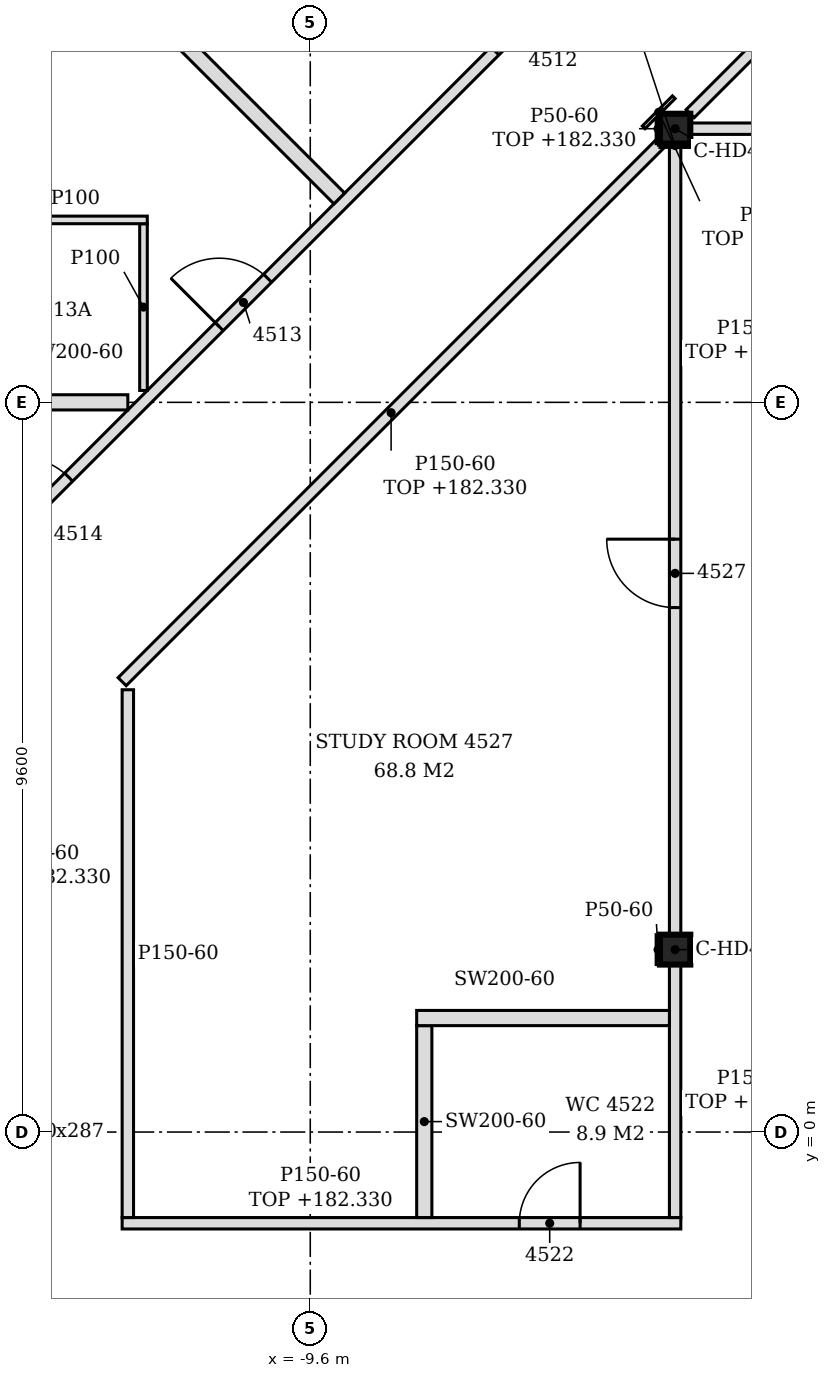
"""IFC4 building model, lengths in metres.
Left out: names, types, materials, properties, quantities, classifications, styles, units other than length and angle.
Written with IfcOpenShell. Run it as: python <this file> out.ifc"""

import sys

from ifc_helpers import new_model, si_unit, direction, frame, frame_2d, origin, origin_2d, place, context, subcontext, project, spatial, polyline, rectangle, i_section, outline, extrude, element, fill, save


model = new_model("IFC4")
c1 = context("Model", 3, precision=1e-05, world=origin(), true_north=direction((0.0, 1.0)))
c2 = subcontext(c1, "Body", "Model", "MODEL_VIEW")
j1 = project(units=[si_unit("LENGTHUNIT", "METRE"), si_unit("PLANEANGLEUNIT", "RADIAN")], contexts=[c1])
p1 = place(None, origin())
s1 = spatial("IfcSite", under=j1, at=p1, CompositionType="ELEMENT")
p2 = place(p1, origin())
s2 = spatial("IfcBuilding", under=s1, at=p2, CompositionType="ELEMENT")
p3 = place(p2, frame((0.0, 0.0, 179.4)))
s3 = spatial("IfcBuildingStorey", under=s2, at=p3, CompositionType="ELEMENT", Elevation=179.4)
for number, where, z_axis, x_axis in (
    (1, (-4.8, 2.4, -0.15), (0.0, 0.0, 1.0), (1.0, 0.0, 0.0)),
    (2, (-4.8, 13.2, -0.15), (0.0, 0.0, 1.0), (1.0, 0.0, 0.0)),
):
    element("IfcColumn", number, at=place(p3, frame(where, z_axis=z_axis, x_axis=x_axis)), inside=s3, PredefinedType="COLUMN", context=c2, shape_type="SweptSolid", body=[
        extrude(i_section(OverallWidth=0.399, OverallDepth=0.393, WebThickness=0.023, FlangeThickness=0.037, FilletRadius=0.015, at=origin_2d()), origin(), (0.0, 0.0, 1.0), 3.6),
    ])
p4 = place(p3, frame((-12.075, -1.2, 0.0), z_axis=(0.0, 0.0, 1.0), x_axis=(1.0, 0.0, 0.0)))
e3 = element("IfcWall", 3, at=p4, inside=s3, PredefinedType="PARTITIONING", context=c2, shape_type="SweptSolid", body=[
    extrude(outline(polyline([(0.0, 0.0), (7.35, 0.0), (7.35, 2.83), (7.125, 2.83), (7.123, 2.93), (0.0, 2.93), (0.0, 0.0)])), frame((0.0, 0.075, 0.0), z_axis=(0.0, -1.0, 0.0), x_axis=(1.0, 0.0, 0.0)), (0.0, 0.0, 1.0), 0.15),
])
p5 = place(p4, frame((5.225, 0.0, 0.0)))
e4 = element("IfcOpeningElement", 4, at=p5, cuts=e3, PredefinedType="OPENING", context=c2, shape_type="SweptSolid", body=[
    extrude(rectangle(XDim=0.8, YDim=2.1, at=frame_2d((0.4, 1.05))), frame((0.0, 0.085, 0.0), z_axis=(0.0, -1.0, 0.0), x_axis=(1.0, 0.0, 0.0)), (0.0, 0.0, 1.0), 0.17),
])
p6 = place(p3, frame((-12.0, -1.125, 0.0), z_axis=(0.0, 0.0, 1.0), x_axis=(0.0, 1.0, 0.0)))
e5 = element("IfcWall", 5, at=p6, inside=s3, PredefinedType="PARTITIONING", context=c2, shape_type="SweptSolid", body=[
    extrude(outline(polyline([(0.0, 0.0), (6.944, 0.0), (6.944, 3.45), (4.675, 3.45), (4.673, 2.93), (4.475, 2.93), (4.473, 3.45), (0.0, 3.45), (0.0, 0.0)])), frame((0.0, 0.075, 0.0), z_axis=(0.0, -1.0, 0.0), x_axis=(1.0, 0.0, 0.0)), (0.0, 0.0, 1.0), 0.15),
])
p7 = place(p3, frame((-8.1, -1.125, 0.0), z_axis=(0.0, 0.0, 1.0), x_axis=(0.0, 1.0, 0.0)))
e6 = element("IfcWall", 6, at=p7, inside=s3, PredefinedType="PARTITIONING", context=c2, shape_type="SweptSolid", body=[
    extrude(rectangle(XDim=2.525, YDim=0.2, at=frame_2d((1.262, 0.0))), origin(), (0.0, 0.0, 1.0), 3.45),
])
p8 = place(p3, frame((-4.8, -1.125, 0.0), z_axis=(0.0, 0.0, 1.0), x_axis=(0.0, 1.0, 0.0)))
e7 = element("IfcWall", 7, at=p8, inside=s3, PredefinedType="PARTITIONING", context=c2, shape_type="SweptSolid", body=[
    extrude(rectangle(XDim=3.329, YDim=0.15, at=frame_2d((1.664, 0.0))), origin(), (0.0, 0.0, 1.0), 2.83),
])
p9 = place(p3, frame((-8.2, 1.5, 0.0), z_axis=(0.0, 0.0, 1.0), x_axis=(1.0, 0.0, 0.0)))
e8 = element("IfcWall", 8, at=p9, inside=s3, PredefinedType="PARTITIONING", context=c2, shape_type="SweptSolid", body=[
    extrude(outline(polyline([(0.0, 0.0), (3.325, 0.0), (3.325, 2.83), (3.25, 2.83), (3.248, 3.45), (0.0, 3.45), (0.0, 0.0)])), frame((0.0, 0.1, 0.0), z_axis=(0.0, -1.0, 0.0), x_axis=(1.0, 0.0, 0.0)), (0.0, 0.0, 1.0), 0.2),
])
p10 = place(p3, frame((-4.8, 2.596, 0.0), z_axis=(0.0, 0.0, 1.0), x_axis=(0.0, 1.0, 0.0)))
e9 = element("IfcWall", 9, at=p10, inside=s3, PredefinedType="PARTITIONING", context=c2, shape_type="SweptSolid", body=[
    extrude(rectangle(XDim=10.407, YDim=0.15, at=frame_2d((5.204, 0.0))), origin(), (0.0, 0.0, 1.0), 2.83),
])
p11 = place(p10, frame((4.303, 0.0, 0.0)))
e10 = element("IfcOpeningElement", 10, at=p11, cuts=e9, PredefinedType="OPENING", context=c2, shape_type="SweptSolid", body=[
    extrude(rectangle(XDim=0.9, YDim=2.1, at=frame_2d((0.45, 1.05))), frame((0.0, 0.085, 0.0), z_axis=(0.0, -1.0, 0.0), x_axis=(1.0, 0.0, 0.0)), (0.0, 0.0, 1.0), 0.17),
])
p12 = place(p3, frame((-12.075, 5.925, 0.0), z_axis=(0.0, 0.0, 1.0), x_axis=(0.707106781187, 0.707106781187, 0.0)))
e11 = element("IfcWall", 11, at=p12, inside=s3, PredefinedType="PARTITIONING", context=c2, shape_type="SweptSolid", body=[
    extrude(rectangle(XDim=10.008, YDim=0.15, at=frame_2d((5.004, 0.0))), origin(), (0.0, 0.0, 1.0), 2.93),
])
p13 = place(p3, frame((-14.475, 6.919, 0.0), z_axis=(0.0, 0.0, 1.0), x_axis=(0.707106781187, 0.707106781187, 0.0)))
e12 = element("IfcWall", 12, at=p13, inside=s3, PredefinedType="PARTITIONING", context=c2, shape_type="SweptSolid", body=[
    extrude(rectangle(XDim=18.036, YDim=0.15, at=frame_2d((9.018, 0.0))), origin(), (0.0, 0.0, 1.0), 2.73),
])
p14 = place(p13, frame((15.683, 0.0, 0.0)))
e13 = element("IfcOpeningElement", 13, at=p14, cuts=e12, PredefinedType="OPENING", context=c2, shape_type="SweptSolid", body=[
    extrude(rectangle(XDim=0.9, YDim=2.1, at=frame_2d((0.45, 1.05))), frame((0.0, 0.085, 0.0), z_axis=(0.0, -1.0, 0.0), x_axis=(1.0, 0.0, 0.0)), (0.0, 0.0, 1.0), 0.17),
])
p15 = place(p13, frame((10.33, 0.0, 0.0)))
e14 = element("IfcOpeningElement", 14, at=p15, cuts=e12, PredefinedType="OPENING", context=c2, shape_type="SweptSolid", body=[
    extrude(rectangle(XDim=0.9, YDim=2.1, at=frame_2d((0.45, 1.05))), frame((0.0, 0.085, 0.0), z_axis=(0.0, -1.0, 0.0), x_axis=(1.0, 0.0, 0.0)), (0.0, 0.0, 1.0), 0.17),
])
p16 = place(p13, frame((5.2, 0.0, 0.0)))
e15 = element("IfcOpeningElement", 15, at=p16, cuts=e12, PredefinedType="OPENING", context=c2, shape_type="SweptSolid", body=[
    extrude(rectangle(XDim=0.9, YDim=2.1, at=frame_2d((0.45, 1.05))), frame((0.0, 0.085, 0.0), z_axis=(0.0, -1.0, 0.0), x_axis=(1.0, 0.0, 0.0)), (0.0, 0.0, 1.0), 0.17),
])
p17 = place(p13, frame((1.499, 0.0, 0.0)))
e16 = element("IfcOpeningElement", 16, at=p17, cuts=e12, PredefinedType="OPENING", context=c2, shape_type="SweptSolid", body=[
    extrude(rectangle(XDim=0.9, YDim=2.1, at=frame_2d((0.45, 1.05))), frame((0.0, 0.085, 0.0), z_axis=(0.0, -1.0, 0.0), x_axis=(1.0, 0.0, 0.0)), (0.0, 0.0, 1.0), 0.17),
])
p18 = place(p3, frame((-14.2, 9.6, 0.0), z_axis=(0.0, 0.0, 1.0), x_axis=(1.0, 0.0, 0.0)))
e17 = element("IfcWall", 17, at=p18, inside=s3, PredefinedType="PARTITIONING", context=c2, shape_type="SweptSolid", body=[
    extrude(rectangle(XDim=2.2, YDim=0.2, at=frame_2d((1.1, 0.0))), origin(), (0.0, 0.0, 1.0), 3.45),
])
p19 = place(p3, frame((-11.794, 9.756, 0.0), z_axis=(0.0, 0.0, 1.0), x_axis=(0.0, 1.0, 0.0)))
e18 = element("IfcWall", 18, at=p19, inside=s3, PredefinedType="PARTITIONING", context=c2, shape_type="SweptSolid", body=[
    extrude(rectangle(XDim=2.194, YDim=0.1, at=frame_2d((1.097, 0.0))), origin(), (0.0, 0.0, 1.0), 3.45),
])
p20 = place(p3, frame((-13.644, 12.0, 0.0), z_axis=(0.0, 0.0, 1.0), x_axis=(1.0, 0.0, 0.0)))
e19 = element("IfcWall", 19, at=p20, inside=s3, PredefinedType="PARTITIONING", context=c2, shape_type="SweptSolid", body=[
    extrude(rectangle(XDim=1.9, YDim=0.1, at=frame_2d((0.95, 0.0))), origin(), (0.0, 0.0, 1.0), 3.45),
])
p21 = place(p3, frame((-9.218, 12.282, 0.0), z_axis=(0.0, 0.0, 1.0), x_axis=(-0.707106781187, 0.707106781187, 0.0)))
e20 = element("IfcWall", 20, at=p21, inside=s3, PredefinedType="PARTITIONING", context=c2, shape_type="SweptSolid", body=[
    extrude(rectangle(XDim=6.594, YDim=0.2, at=frame_2d((3.297, 0.0))), origin(), (0.0, 0.0, 1.0), 2.93),
])
p22 = place(p3, frame((-4.601, 13.2, 0.0), z_axis=(0.0, 0.0, 1.0), x_axis=(1.0, 0.0, 0.0)))
e21 = element("IfcWall", 21, at=p22, inside=s3, PredefinedType="PARTITIONING", context=c2, shape_type="SweptSolid", body=[
    extrude(rectangle(XDim=9.476, YDim=0.15, at=frame_2d((4.738, 0.0))), origin(), (0.0, 0.0, 1.0), 2.83),
])
p23 = place(p22, frame((4.151, 0.0, 0.0)))
e22 = element("IfcOpeningElement", 22, at=p23, cuts=e21, PredefinedType="OPENING", context=c2, shape_type="SweptSolid", body=[
    extrude(rectangle(XDim=0.9, YDim=2.1, at=frame_2d((0.45, 1.05))), frame((0.0, 0.085, 0.0), z_axis=(0.0, -1.0, 0.0), x_axis=(1.0, 0.0, 0.0)), (0.0, 0.0, 1.0), 0.17),
])
p24 = place(p3, frame((-4.602, 13.398, 0.0), z_axis=(0.0, 0.0, 1.0), x_axis=(0.707106781187, 0.707106781187, 0.0)))
e23 = element("IfcWall", 23, at=p24, inside=s3, PredefinedType="PARTITIONING", context=c2, shape_type="SweptSolid", body=[
    extrude(rectangle(XDim=5.479, YDim=0.15, at=frame_2d((2.739, 0.0))), origin(), (0.0, 0.0, 1.0), 3.45),
])
p25 = place(p3, frame((-5.024, 2.204, 0.0), z_axis=(0.0, 0.0, 1.0), x_axis=(0.0, 1.0, 0.0)))
e24 = element("IfcWall", 24, at=p25, inside=s3, PredefinedType="PARTITIONING", context=c2, shape_type="SweptSolid", body=[
    extrude(rectangle(XDim=0.393, YDim=0.05, at=frame_2d((0.196, 0.0))), origin(), (0.0, 0.0, 1.0), 3.45),
])
p26 = place(p3, frame((-5.024, 13.003, 0.0), z_axis=(0.0, 0.0, 1.0), x_axis=(0.0, 1.0, 0.0)))
e25 = element("IfcWall", 25, at=p26, inside=s3, PredefinedType="PARTITIONING", context=c2, shape_type="SweptSolid", body=[
    extrude(rectangle(XDim=0.393, YDim=0.05, at=frame_2d((0.197, 0.0))), origin(), (0.0, 0.0, 1.0), 2.93),
])
p27 = place(p3, frame((-5.214, 13.218, 0.0), z_axis=(0.0, 0.0, 1.0), x_axis=(0.707106781187, 0.707106781187, 0.0)))
e26 = element("IfcWall", 26, at=p27, inside=s3, PredefinedType="PARTITIONING", context=c2, shape_type="SweptSolid", body=[
    extrude(rectangle(XDim=0.56, YDim=0.05, at=frame_2d((0.28, 0.0))), origin(), (0.0, 0.0, 1.0), 2.73),
])
p28 = place(p3, frame((-5.0, 12.979, 0.0), z_axis=(0.0, 0.0, 1.0), x_axis=(1.0, 0.0, 0.0)))
e27 = element("IfcWall", 27, at=p28, inside=s3, PredefinedType="PARTITIONING", context=c2, shape_type="SweptSolid", body=[
    extrude(rectangle(XDim=0.399, YDim=0.05, at=frame_2d((0.199, 0.0))), origin(), (0.0, 0.0, 1.0), 2.83),
])
p29 = place(p16, origin())
e28 = element("IfcDoor", 28, at=p29, inside=s3, OperationType="SINGLE_SWING_LEFT", PredefinedType="DOOR", context=c2, shape_type="SweptSolid", body=[
    extrude(rectangle(XDim=0.9, YDim=2.1, at=frame_2d((0.45, 1.05))), frame((0.0, 0.025, 0.0), z_axis=(0.0, -1.0, 0.0), x_axis=(1.0, 0.0, 0.0)), (0.0, 0.0, 1.0), 0.05),
])
fill(e15, e28)
p30 = place(p17, origin())
e29 = element("IfcDoor", 29, at=p30, inside=s3, OperationType="SINGLE_SWING_LEFT", PredefinedType="DOOR", context=c2, shape_type="SweptSolid", body=[
    extrude(rectangle(XDim=0.9, YDim=2.1, at=frame_2d((0.45, 1.05))), frame((0.0, 0.025, 0.0), z_axis=(0.0, -1.0, 0.0), x_axis=(1.0, 0.0, 0.0)), (0.0, 0.0, 1.0), 0.05),
])
fill(e16, e29)
p31 = place(p5, origin())
e30 = element("IfcDoor", 30, at=p31, inside=s3, OperationType="SINGLE_SWING_RIGHT", PredefinedType="DOOR", context=c2, shape_type="SweptSolid", body=[
    extrude(rectangle(XDim=0.8, YDim=2.1, at=frame_2d((0.4, 1.05))), frame((0.0, 0.025, 0.0), z_axis=(0.0, -1.0, 0.0), x_axis=(1.0, 0.0, 0.0)), (0.0, 0.0, 1.0), 0.05),
])
fill(e4, e30)
p32 = place(p11, origin())
e31 = element("IfcDoor", 31, at=p32, inside=s3, OperationType="SINGLE_SWING_RIGHT", PredefinedType="DOOR", context=c2, shape_type="SweptSolid", body=[
    extrude(rectangle(XDim=0.9, YDim=2.1, at=frame_2d((0.45, 1.05))), frame((0.0, 0.025, 0.0), z_axis=(0.0, -1.0, 0.0), x_axis=(1.0, 0.0, 0.0)), (0.0, 0.0, 1.0), 0.05),
])
fill(e10, e31)
save(model, sys.argv[1])
